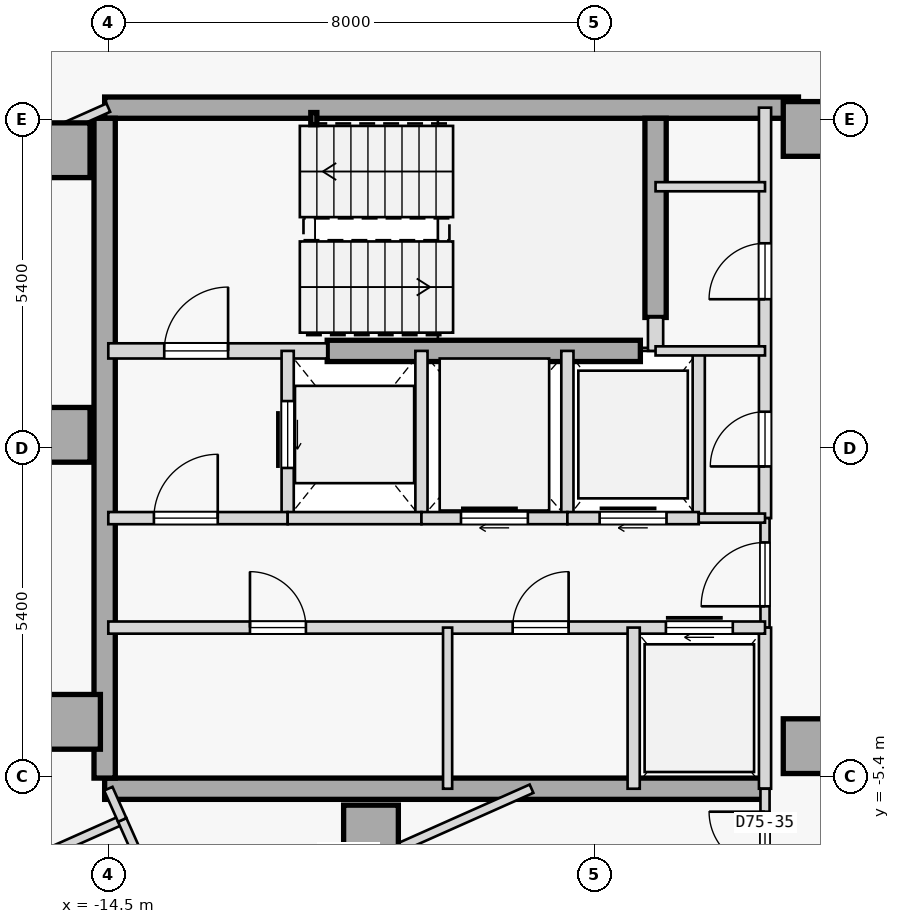
"""IFC4 building model, lengths in metres.
Left out: names, types, materials, properties, quantities, classifications, styles, units other than length and angle.
Written with IfcOpenShell. Run it as: python <this file> out.ifc"""

import sys

from ifc_helpers import new_model, si_unit, direction, frame, frame_2d, origin, origin_2d, place, context, subcontext, project, spatial, rectangle, hollow_rectangle, extrude, element, fill, save


model = new_model("IFC4")
c1 = context("Model", 3, precision=1e-05, world=origin(), true_north=direction((0.0, 1.0)))
c2 = subcontext(c1, "Body", "Model", "MODEL_VIEW")
j1 = project(units=[si_unit("LENGTHUNIT", "METRE"), si_unit("PLANEANGLEUNIT", "RADIAN")], contexts=[c1])
p1 = place(None, origin())
s1 = spatial("IfcSite", under=j1, at=p1, CompositionType="ELEMENT")
p2 = place(p1, origin())
s2 = spatial("IfcBuilding", under=s1, at=p2, CompositionType="ELEMENT")
p3 = place(p2, frame((0.0, 0.0, 281.9)))
s3 = spatial("IfcBuildingStorey", under=s2, at=p3, CompositionType="ELEMENT", Elevation=281.9)
for number, where, z_axis, x_axis in (
    (1, (-15.25, 4.9, 0.0), (0.0, 0.0, 1.0), (1.0, 0.0, 0.0)),
    (2, (-15.25, 0.22, 0.0), (0.0, 0.0, 1.0), (1.0, 0.0, 0.0)),
    (3, (-15.08, -4.5, 0.0), (0.0, 0.0, 1.0), (1.0, 0.0, 0.0)),
    (4, (-10.18, -6.32, 0.0), (0.0, 0.0, 1.0), (1.0, 0.0, 0.0)),
    (5, (-2.95, -4.9, 0.0), (0.0, 0.0, 1.0), (1.0, 0.0, 0.0)),
    (6, (-2.95, 5.25, 0.0), (0.0, 0.0, 1.0), (1.0, 0.0, 0.0)),
):
    element("IfcColumn", number, at=place(p3, frame(where, z_axis=z_axis, x_axis=x_axis)), inside=s3, PredefinedType="COLUMN", context=c2, shape_type="SweptSolid", body=[
        extrude(rectangle(XDim=0.9, YDim=0.9, at=origin_2d()), origin(), (0.0, 0.0, 1.0), 3.35),
    ])
p4 = place(p3, frame((-14.56, 5.6, 0.0), z_axis=(0.0, 0.0, 1.0), x_axis=(1.0, 0.0, 0.0)))
e7 = element("IfcWall", 7, at=p4, inside=s3, PredefinedType="SHEAR", context=c2, shape_type="SweptSolid", body=[
    extrude(rectangle(XDim=11.41, YDim=0.35, at=frame_2d((5.705, 0.0))), origin(), (0.0, 0.0, 1.0), 3.125),
])
p5 = place(p3, frame((-14.56, -5.6, 0.0), z_axis=(0.0, 0.0, 1.0), x_axis=(1.0, 0.0, 0.0)))
e8 = element("IfcWall", 8, at=p5, inside=s3, PredefinedType="SHEAR", context=c2, shape_type="SweptSolid", body=[
    extrude(rectangle(XDim=10.86, YDim=0.35, at=frame_2d((5.43, 0.0))), origin(), (0.0, 0.0, 1.0), 3.125),
])
p6 = place(p3, frame((-14.56, -5.425, 0.0), z_axis=(0.0, 0.0, 1.0), x_axis=(0.0, 1.0, 0.0)))
e9 = element("IfcWall", 9, at=p6, inside=s3, PredefinedType="SHEAR", context=c2, shape_type="SweptSolid", body=[
    extrude(rectangle(XDim=10.85, YDim=0.35, at=frame_2d((5.425, 0.0))), origin(), (0.0, 0.0, 1.0), 3.125),
])
p7 = place(p3, frame((-5.5, 2.15, 0.0), z_axis=(0.0, 0.0, 1.0), x_axis=(0.0, 1.0, 0.0)))
e10 = element("IfcWall", 10, at=p7, inside=s3, PredefinedType="SHEAR", context=c2, shape_type="SweptSolid", body=[
    extrude(rectangle(XDim=3.275, YDim=0.35, at=frame_2d((1.638, 0.0))), origin(), (0.0, 0.0, 1.0), 3.125),
])
p8 = place(p3, frame((-10.9, 1.6, 0.0), z_axis=(0.0, 0.0, 1.0), x_axis=(1.0, 0.0, 0.0)))
e11 = element("IfcWall", 11, at=p8, inside=s3, PredefinedType="SHEAR", context=c2, shape_type="SweptSolid", body=[
    extrude(rectangle(XDim=5.15, YDim=0.35, at=frame_2d((2.575, 0.0))), origin(), (0.0, 0.0, 1.0), 3.125),
])
p9 = place(p3, frame((-11.12, 5.42, 0.0), z_axis=(0.0, 0.0, 1.0), x_axis=(1.0, 0.0, 0.0)))
e12 = element("IfcColumn", 12, at=p9, inside=s3, PredefinedType="COLUMN", context=c2, shape_type="SweptSolid", body=[
    extrude(hollow_rectangle(XDim=0.1, YDim=0.2, WallThickness=0.008, at=origin_2d()), origin(), (0.0, 0.0, 1.0), 3.35),
])
p10 = place(p3, frame((-14.5, 1.6, 0.0), z_axis=(0.0, 0.0, 1.0), x_axis=(1.0, 0.0, 0.0)))
e13 = element("IfcWall", 13, at=p10, inside=s3, PredefinedType="STANDARD", context=c2, shape_type="SweptSolid", body=[
    extrude(rectangle(XDim=3.6, YDim=0.25, at=frame_2d((1.8, 0.0))), origin(), (0.0, 0.0, 1.0), 3.125),
])
p11 = place(p10, frame((0.92, 0.0, 0.0)))
e14 = element("IfcOpeningElement", 14, at=p11, cuts=e13, PredefinedType="OPENING", context=c2, shape_type="SweptSolid", body=[
    extrude(rectangle(XDim=1.05, YDim=2.15, at=frame_2d((0.525, 1.075))), frame((0.0, 0.135, 0.0), z_axis=(0.0, -1.0, 0.0), x_axis=(1.0, 0.0, 0.0)), (0.0, 0.0, 1.0), 0.27),
])
p12 = place(p3, frame((-5.5, 1.6, 0.0), z_axis=(0.0, 0.0, 1.0), x_axis=(0.0, 1.0, 0.0)))
e15 = element("IfcWall", 15, at=p12, inside=s3, PredefinedType="STANDARD", context=c2, shape_type="SweptSolid", body=[
    extrude(rectangle(XDim=0.55, YDim=0.25, at=frame_2d((0.275, 0.0))), origin(), (0.0, 0.0, 1.0), 3.125),
])
p13 = place(p3, frame((-3.7, -1.15, 0.0), z_axis=(0.0, 0.0, 1.0), x_axis=(0.0, 1.0, 0.0)))
e16 = element("IfcWall", 16, at=p13, inside=s3, PredefinedType="STANDARD", context=c2, shape_type="SweptSolid", body=[
    extrude(rectangle(XDim=6.75, YDim=0.2, at=frame_2d((3.375, 0.0))), origin(), (0.0, 0.0, 1.0), 3.125),
])
p14 = place(p13, frame((3.6, 0.0, 0.0)))
e17 = element("IfcOpeningElement", 17, at=p14, cuts=e16, PredefinedType="OPENING", context=c2, shape_type="SweptSolid", body=[
    extrude(rectangle(XDim=0.92, YDim=2.15, at=frame_2d((0.46, 1.075))), frame((0.0, 0.11, 0.0), z_axis=(0.0, -1.0, 0.0), x_axis=(1.0, 0.0, 0.0)), (0.0, 0.0, 1.0), 0.22),
])
p15 = place(p13, frame((0.85, 0.0, 0.0)))
e18 = element("IfcOpeningElement", 18, at=p15, cuts=e16, PredefinedType="OPENING", context=c2, shape_type="SweptSolid", body=[
    extrude(rectangle(XDim=0.9, YDim=2.15, at=frame_2d((0.45, 1.075))), frame((0.0, 0.11, 0.0), z_axis=(0.0, -1.0, 0.0), x_axis=(1.0, 0.0, 0.0)), (0.0, 0.0, 1.0), 0.22),
])
p16 = place(p3, frame((-3.7, -2.95, 0.0), z_axis=(0.0, 0.0, 1.0), x_axis=(0.0, 1.0, 0.0)))
e19 = element("IfcWall", 19, at=p16, inside=s3, PredefinedType="PARTITIONING", context=c2, shape_type="SweptSolid", body=[
    extrude(rectangle(XDim=1.8, YDim=0.15, at=frame_2d((0.9, 0.0))), origin(), (0.0, 0.0, 1.0), 3.125),
])
p17 = place(p16, frame((0.35, 0.0, 0.0)))
e20 = element("IfcOpeningElement", 20, at=p17, cuts=e19, PredefinedType="OPENING", context=c2, shape_type="SweptSolid", body=[
    extrude(rectangle(XDim=1.05, YDim=2.18, at=frame_2d((0.525, 1.09))), frame((0.0, 0.085, 0.0), z_axis=(0.0, -1.0, 0.0), x_axis=(1.0, 0.0, 0.0)), (0.0, 0.0, 1.0), 0.17),
])
p18 = place(p3, frame((-3.7, -5.6, 0.0), z_axis=(0.0, 0.0, 1.0), x_axis=(0.0, 1.0, 0.0)))
e21 = element("IfcWall", 21, at=p18, inside=s3, PredefinedType="STANDARD", context=c2, shape_type="SweptSolid", body=[
    extrude(rectangle(XDim=2.65, YDim=0.2, at=frame_2d((1.325, 0.0))), origin(), (0.0, 0.0, 1.0), 3.125),
])
p19 = place(p3, frame((-11.55, -1.15, 0.0), z_axis=(0.0, 0.0, 1.0), x_axis=(0.0, 1.0, 0.0)))
e22 = element("IfcWall", 22, at=p19, inside=s3, PredefinedType="STANDARD", context=c2, shape_type="SweptSolid", body=[
    extrude(rectangle(XDim=2.75, YDim=0.2, at=frame_2d((1.375, 0.0))), origin(), (0.0, 0.0, 1.0), 3.125),
])
p20 = place(p19, frame((0.825, 0.0, 0.0)))
e23 = element("IfcOpeningElement", 23, at=p20, cuts=e22, PredefinedType="OPENING", context=c2, shape_type="SweptSolid", body=[
    extrude(rectangle(XDim=1.1, YDim=2.15, at=frame_2d((0.55, 1.075))), frame((0.0, 0.11, 0.0), z_axis=(0.0, -1.0, 0.0), x_axis=(1.0, 0.0, 0.0)), (0.0, 0.0, 1.0), 0.22),
])
p21 = place(p3, frame((-9.35, -1.15, 0.0), z_axis=(0.0, 0.0, 1.0), x_axis=(0.0, 1.0, 0.0)))
e24 = element("IfcWall", 24, at=p21, inside=s3, PredefinedType="STANDARD", context=c2, shape_type="SweptSolid", body=[
    extrude(rectangle(XDim=2.75, YDim=0.2, at=frame_2d((1.375, 0.0))), origin(), (0.0, 0.0, 1.0), 3.125),
])
p22 = place(p3, frame((-14.5, -1.15, 0.0), z_axis=(0.0, 0.0, 1.0), x_axis=(1.0, 0.0, 0.0)))
e25 = element("IfcWall", 25, at=p22, inside=s3, PredefinedType="STANDARD", context=c2, shape_type="SweptSolid", body=[
    extrude(rectangle(XDim=2.95, YDim=0.2, at=frame_2d((1.475, 0.0))), origin(), (0.0, 0.0, 1.0), 3.125),
])
p23 = place(p22, frame((0.75, 0.0, 0.0)))
e26 = element("IfcOpeningElement", 26, at=p23, cuts=e25, PredefinedType="OPENING", context=c2, shape_type="SweptSolid", body=[
    extrude(rectangle(XDim=1.05, YDim=2.18, at=frame_2d((0.525, 1.09))), frame((0.0, 0.11, 0.0), z_axis=(0.0, -1.0, 0.0), x_axis=(1.0, 0.0, 0.0)), (0.0, 0.0, 1.0), 0.22),
])
p24 = place(p3, frame((-11.55, -1.15, 0.0), z_axis=(0.0, 0.0, 1.0), x_axis=(1.0, 0.0, 0.0)))
e27 = element("IfcWall", 27, at=p24, inside=s3, PredefinedType="STANDARD", context=c2, shape_type="SweptSolid", body=[
    extrude(rectangle(XDim=2.2, YDim=0.2, at=frame_2d((1.1, 0.0))), origin(), (0.0, 0.0, 1.0), 3.125),
])
p25 = place(p3, frame((-6.95, -1.15, 0.0), z_axis=(0.0, 0.0, 1.0), x_axis=(0.0, 1.0, 0.0)))
e28 = element("IfcWall", 28, at=p25, inside=s3, PredefinedType="STANDARD", context=c2, shape_type="SweptSolid", body=[
    extrude(rectangle(XDim=2.75, YDim=0.2, at=frame_2d((1.375, 0.0))), origin(), (0.0, 0.0, 1.0), 3.125),
])
p26 = place(p3, frame((-9.35, -1.15, 0.0), z_axis=(0.0, 0.0, 1.0), x_axis=(1.0, 0.0, 0.0)))
e29 = element("IfcWall", 29, at=p26, inside=s3, PredefinedType="STANDARD", context=c2, shape_type="SweptSolid", body=[
    extrude(rectangle(XDim=2.4, YDim=0.2, at=frame_2d((1.2, 0.0))), origin(), (0.0, 0.0, 1.0), 3.125),
])
p27 = place(p26, frame((0.65, 0.0, 0.0)))
e30 = element("IfcOpeningElement", 30, at=p27, cuts=e29, PredefinedType="OPENING", context=c2, shape_type="SweptSolid", body=[
    extrude(rectangle(XDim=1.1, YDim=2.15, at=frame_2d((0.55, 1.075))), frame((0.0, 0.11, 0.0), z_axis=(0.0, -1.0, 0.0), x_axis=(1.0, 0.0, 0.0)), (0.0, 0.0, 1.0), 0.22),
])
p28 = place(p3, frame((-4.79, -1.15, 0.0), z_axis=(0.0, 0.0, 1.0), x_axis=(0.0, 1.0, 0.0)))
e31 = element("IfcWall", 31, at=p28, inside=s3, PredefinedType="STANDARD", context=c2, shape_type="SweptSolid", body=[
    extrude(rectangle(XDim=2.75, YDim=0.2, at=frame_2d((1.375, 0.0))), origin(), (0.0, 0.0, 1.0), 3.125),
])
p29 = place(p3, frame((-6.95, -1.15, 0.0), z_axis=(0.0, 0.0, 1.0), x_axis=(1.0, 0.0, 0.0)))
e32 = element("IfcWall", 32, at=p29, inside=s3, PredefinedType="STANDARD", context=c2, shape_type="SweptSolid", body=[
    extrude(rectangle(XDim=2.16, YDim=0.2, at=frame_2d((1.08, 0.0))), origin(), (0.0, 0.0, 1.0), 3.125),
])
p30 = place(p29, frame((0.53, 0.0, 0.0)))
e33 = element("IfcOpeningElement", 33, at=p30, cuts=e32, PredefinedType="OPENING", context=c2, shape_type="SweptSolid", body=[
    extrude(rectangle(XDim=1.1, YDim=2.15, at=frame_2d((0.55, 1.075))), frame((0.0, 0.11, 0.0), z_axis=(0.0, -1.0, 0.0), x_axis=(1.0, 0.0, 0.0)), (0.0, 0.0, 1.0), 0.22),
])
p31 = place(p3, frame((-4.79, -1.15, 0.0), z_axis=(0.0, 0.0, 1.0), x_axis=(1.0, 0.0, 0.0)))
e34 = element("IfcWall", 34, at=p31, inside=s3, PredefinedType="PARTITIONING", context=c2, shape_type="SweptSolid", body=[
    extrude(rectangle(XDim=1.09, YDim=0.15, at=frame_2d((0.545, 0.0))), origin(), (0.0, 0.0, 1.0), 3.125),
])
p32 = place(p3, frame((-14.5, -2.95, 0.0), z_axis=(0.0, 0.0, 1.0), x_axis=(1.0, 0.0, 0.0)))
e35 = element("IfcWall", 35, at=p32, inside=s3, PredefinedType="STANDARD", context=c2, shape_type="SweptSolid", body=[
    extrude(rectangle(XDim=10.8, YDim=0.2, at=frame_2d((5.4, 0.0))), origin(), (0.0, 0.0, 1.0), 3.125),
])
p33 = place(p32, frame((9.17, 0.0, 0.0)))
e36 = element("IfcOpeningElement", 36, at=p33, cuts=e35, PredefinedType="OPENING", context=c2, shape_type="SweptSolid", body=[
    extrude(rectangle(XDim=1.1, YDim=2.15, at=frame_2d((0.55, 1.075))), frame((0.0, 0.11, 0.0), z_axis=(0.0, -1.0, 0.0), x_axis=(1.0, 0.0, 0.0)), (0.0, 0.0, 1.0), 0.22),
])
p34 = place(p32, frame((2.33, 0.0, 0.0)))
e37 = element("IfcOpeningElement", 37, at=p34, cuts=e35, PredefinedType="OPENING", context=c2, shape_type="SweptSolid", body=[
    extrude(rectangle(XDim=0.92, YDim=2.15, at=frame_2d((0.46, 1.075))), frame((0.0, 0.11, 0.0), z_axis=(0.0, -1.0, 0.0), x_axis=(1.0, 0.0, 0.0)), (0.0, 0.0, 1.0), 0.22),
])
p35 = place(p32, frame((6.65, 0.0, 0.0)))
e38 = element("IfcOpeningElement", 38, at=p35, cuts=e35, PredefinedType="OPENING", context=c2, shape_type="SweptSolid", body=[
    extrude(rectangle(XDim=0.92, YDim=2.15, at=frame_2d((0.46, 1.075))), frame((0.0, 0.11, 0.0), z_axis=(0.0, -1.0, 0.0), x_axis=(1.0, 0.0, 0.0)), (0.0, 0.0, 1.0), 0.22),
])
p36 = place(p3, frame((-5.86, -5.6, 0.0), z_axis=(0.0, 0.0, 1.0), x_axis=(0.0, 1.0, 0.0)))
e39 = element("IfcWall", 39, at=p36, inside=s3, PredefinedType="STANDARD", context=c2, shape_type="SweptSolid", body=[
    extrude(rectangle(XDim=2.65, YDim=0.2, at=frame_2d((1.325, 0.0))), origin(), (0.0, 0.0, 1.0), 3.125),
])
p37 = place(p3, frame((-8.92, -5.6, 0.0), z_axis=(0.0, 0.0, 1.0), x_axis=(0.0, 1.0, 0.0)))
e40 = element("IfcWall", 40, at=p37, inside=s3, PredefinedType="PARTITIONING", context=c2, shape_type="SweptSolid", body=[
    extrude(rectangle(XDim=2.65, YDim=0.15, at=frame_2d((1.325, 0.0))), origin(), (0.0, 0.0, 1.0), 3.125),
])
for number, where, z_axis, x_axis in (
    (41, (-5.5, 4.3, 0.0), (0.0, 0.0, 1.0), (1.0, 0.0, 0.0)),
    (42, (-5.5, 1.6, 0.0), (0.0, 0.0, 1.0), (1.0, 0.0, 0.0)),
):
    element("IfcWall", number, at=place(p3, frame(where, z_axis=z_axis, x_axis=x_axis)), inside=s3, PredefinedType="PARTITIONING", context=c2, shape_type="SweptSolid", body=[
        extrude(rectangle(XDim=1.8, YDim=0.15, at=frame_2d((0.9, 0.0))), origin(), (0.0, 0.0, 1.0), 3.125),
    ])
p38 = place(p3, frame((-3.7, -7.118, 0.0), z_axis=(0.0, 0.0, 1.0), x_axis=(0.000321543392, 0.999999948305, 0.0)))
e43 = element("IfcWall", 43, at=p38, inside=s3, PredefinedType="PARTITIONING", context=c2, shape_type="SweptSolid", body=[
    extrude(rectangle(XDim=1.519, YDim=0.15, at=frame_2d((0.759, 0.0))), origin(), (0.0, 0.0, 1.0), 3.125),
])
p39 = place(p38, frame((0.22, 0.0, 0.0)))
e44 = element("IfcOpeningElement", 44, at=p39, cuts=e43, PredefinedType="OPENING", context=c2, shape_type="SweptSolid", body=[
    extrude(rectangle(XDim=0.92, YDim=2.15, at=frame_2d((0.46, 1.075))), frame((0.0, 0.085, 0.0), z_axis=(0.0, -1.0, 0.0), x_axis=(1.0, 0.0, 0.0)), (0.0, 0.0, 1.0), 0.17),
])
p40 = place(p3, frame((-18.661, 3.747, 0.0), z_axis=(0.0, 0.0, 1.0), x_axis=(0.913535055583, 0.40676000568, 0.0)))
e45 = element("IfcWall", 45, at=p40, inside=s3, PredefinedType="PARTITIONING", context=c2, shape_type="SweptSolid", body=[
    extrude(rectangle(XDim=4.555, YDim=0.15, at=frame_2d((2.277, 0.0))), origin(), (0.0, 0.0, 1.0), 3.125),
])
p41 = place(p40, frame((1.134, 0.0, 0.0)))
e46 = element("IfcOpeningElement", 46, at=p41, cuts=e45, PredefinedType="OPENING", context=c2, shape_type="SweptSolid", body=[
    extrude(rectangle(XDim=0.92, YDim=2.15, at=frame_2d((0.46, 1.075))), frame((0.0, 0.085, 0.0), z_axis=(0.0, -1.0, 0.0), x_axis=(1.0, 0.0, 0.0)), (0.0, 0.0, 1.0), 0.17),
])
p42 = place(p3, frame((-25.014, -10.896, 0.0), z_axis=(0.0, 0.0, 1.0), x_axis=(0.913544247064, 0.406739362069, 0.0)))
e47 = element("IfcWall", 47, at=p42, inside=s3, PredefinedType="PARTITIONING", context=c2, shape_type="SweptSolid", body=[
    extrude(rectangle(XDim=11.76, YDim=0.15, at=frame_2d((5.88, 0.0))), origin(), (0.0, 0.0, 1.0), 3.125),
])
p43 = place(p42, frame((5.42, 0.0, 0.0)))
e48 = element("IfcOpeningElement", 48, at=p43, cuts=e47, PredefinedType="OPENING", context=c2, shape_type="SweptSolid", body=[
    extrude(rectangle(XDim=0.92, YDim=2.15, at=frame_2d((0.46, 1.075))), frame((0.0, 0.085, 0.0), z_axis=(0.0, -1.0, 0.0), x_axis=(1.0, 0.0, 0.0)), (0.0, 0.0, 1.0), 0.17),
])
p44 = place(p3, frame((-13.348, -8.186, 0.0), z_axis=(0.0, 0.0, 1.0), x_axis=(-0.40673740295, 0.913545119324, 0.0)))
e49 = element("IfcWall", 49, at=p44, inside=s3, PredefinedType="PARTITIONING", context=c2, shape_type="SweptSolid", body=[
    extrude(rectangle(XDim=2.269, YDim=0.15, at=frame_2d((1.134, 0.0))), origin(), (0.0, 0.0, 1.0), 3.125),
])
p45 = place(p3, frame((-14.271, -6.113, 0.0), z_axis=(0.0, 0.0, 1.0), x_axis=(-0.406622099206, 0.913596447255, 0.0)))
e50 = element("IfcWall", 50, at=p45, inside=s3, PredefinedType="PARTITIONING", context=c2, shape_type="SweptSolid", body=[
    extrude(rectangle(XDim=0.562, YDim=0.15, at=frame_2d((0.281, 0.0))), origin(), (0.0, 0.0, 1.0), 3.125),
])
p46 = place(p3, frame((-13.348, -8.186, 0.0), z_axis=(0.0, 0.0, 1.0), x_axis=(0.913551673432, 0.406722681896, 0.0)))
e51 = element("IfcWall", 51, at=p46, inside=s3, PredefinedType="PARTITIONING", context=c2, shape_type="SweptSolid", body=[
    extrude(rectangle(XDim=6.358, YDim=0.15, at=frame_2d((3.179, 0.0))), origin(), (0.0, 0.0, 1.0), 3.125),
])
p47 = place(p46, frame((0.939, 0.0, 0.0)))
e52 = element("IfcOpeningElement", 52, at=p47, cuts=e51, PredefinedType="OPENING", context=c2, shape_type="SweptSolid", body=[
    extrude(rectangle(XDim=0.92, YDim=2.15, at=frame_2d((0.46, 1.075))), frame((0.0, 0.085, 0.0), z_axis=(0.0, -1.0, 0.0), x_axis=(1.0, 0.0, 0.0)), (0.0, 0.0, 1.0), 0.17),
])
p48 = place(p11, origin())
e53 = element("IfcDoor", 53, at=p48, inside=s3, OperationType="SINGLE_SWING_RIGHT", PredefinedType="DOOR", context=c2, shape_type="SweptSolid", body=[
    extrude(rectangle(XDim=1.05, YDim=2.15, at=frame_2d((0.525, 1.075))), frame((0.0, 0.025, 0.0), z_axis=(0.0, -1.0, 0.0), x_axis=(1.0, 0.0, 0.0)), (0.0, 0.0, 1.0), 0.05),
])
fill(e14, e53)
p49 = place(p23, origin())
e54 = element("IfcDoor", 54, at=p49, inside=s3, OperationType="SINGLE_SWING_RIGHT", PredefinedType="DOOR", context=c2, shape_type="SweptSolid", body=[
    extrude(rectangle(XDim=1.05, YDim=2.18, at=frame_2d((0.525, 1.09))), frame((0.0, 0.025, 0.0), z_axis=(0.0, -1.0, 0.0), x_axis=(1.0, 0.0, 0.0)), (0.0, 0.0, 1.0), 0.05),
])
fill(e26, e54)
p50 = place(p17, origin())
e55 = element("IfcDoor", 55, at=p50, inside=s3, OperationType="SINGLE_SWING_LEFT", PredefinedType="DOOR", context=c2, shape_type="SweptSolid", body=[
    extrude(rectangle(XDim=1.05, YDim=2.18, at=frame_2d((0.525, 1.09))), frame((0.0, 0.025, 0.0), z_axis=(0.0, -1.0, 0.0), x_axis=(1.0, 0.0, 0.0)), (0.0, 0.0, 1.0), 0.05),
])
fill(e20, e55)
p51 = place(p20, origin())
e56 = element("IfcDoor", 56, at=p51, inside=s3, OperationType="SLIDING_TO_RIGHT", PredefinedType="DOOR", context=c2, shape_type="SweptSolid", body=[
    extrude(rectangle(XDim=1.1, YDim=2.15, at=frame_2d((0.55, 1.075))), frame((0.0, 0.025, 0.0), z_axis=(0.0, -1.0, 0.0), x_axis=(1.0, 0.0, 0.0)), (0.0, 0.0, 1.0), 0.05),
])
fill(e23, e56)
p52 = place(p27, origin())
e57 = element("IfcDoor", 57, at=p52, inside=s3, OperationType="SLIDING_TO_RIGHT", PredefinedType="DOOR", context=c2, shape_type="SweptSolid", body=[
    extrude(rectangle(XDim=1.1, YDim=2.15, at=frame_2d((0.55, 1.075))), frame((0.0, 0.025, 0.0), z_axis=(0.0, -1.0, 0.0), x_axis=(1.0, 0.0, 0.0)), (0.0, 0.0, 1.0), 0.05),
])
fill(e30, e57)
p53 = place(p30, origin())
e58 = element("IfcDoor", 58, at=p53, inside=s3, OperationType="SLIDING_TO_RIGHT", PredefinedType="DOOR", context=c2, shape_type="SweptSolid", body=[
    extrude(rectangle(XDim=1.1, YDim=2.15, at=frame_2d((0.55, 1.075))), frame((0.0, 0.025, 0.0), z_axis=(0.0, -1.0, 0.0), x_axis=(1.0, 0.0, 0.0)), (0.0, 0.0, 1.0), 0.05),
])
fill(e33, e58)
p54 = place(p33, origin())
e59 = element("IfcDoor", 59, at=p54, inside=s3, OperationType="SLIDING_TO_RIGHT", PredefinedType="DOOR", context=c2, shape_type="SweptSolid", body=[
    extrude(rectangle(XDim=1.1, YDim=2.15, at=frame_2d((0.55, 1.075))), frame((0.0, 0.025, 0.0), z_axis=(0.0, -1.0, 0.0), x_axis=(1.0, 0.0, 0.0)), (0.0, 0.0, 1.0), 0.05),
])
fill(e36, e59)
p55 = place(p34, origin())
e60 = element("IfcDoor", 60, at=p55, inside=s3, OperationType="SINGLE_SWING_LEFT", PredefinedType="DOOR", context=c2, shape_type="SweptSolid", body=[
    extrude(rectangle(XDim=0.92, YDim=2.15, at=frame_2d((0.46, 1.075))), frame((0.0, 0.025, 0.0), z_axis=(0.0, -1.0, 0.0), x_axis=(1.0, 0.0, 0.0)), (0.0, 0.0, 1.0), 0.05),
])
fill(e37, e60)
p56 = place(p35, origin())
e61 = element("IfcDoor", 61, at=p56, inside=s3, OperationType="SINGLE_SWING_RIGHT", PredefinedType="DOOR", context=c2, shape_type="SweptSolid", body=[
    extrude(rectangle(XDim=0.92, YDim=2.15, at=frame_2d((0.46, 1.075))), frame((0.0, 0.025, 0.0), z_axis=(0.0, -1.0, 0.0), x_axis=(1.0, 0.0, 0.0)), (0.0, 0.0, 1.0), 0.05),
])
fill(e38, e61)
p57 = place(p14, origin())
e62 = element("IfcDoor", 62, at=p57, inside=s3, OperationType="SINGLE_SWING_LEFT", PredefinedType="DOOR", context=c2, shape_type="SweptSolid", body=[
    extrude(rectangle(XDim=0.92, YDim=2.15, at=frame_2d((0.46, 1.075))), frame((0.0, 0.025, 0.0), z_axis=(0.0, -1.0, 0.0), x_axis=(1.0, 0.0, 0.0)), (0.0, 0.0, 1.0), 0.05),
])
fill(e17, e62)
p58 = place(p15, origin())
e63 = element("IfcDoor", 63, at=p58, inside=s3, OperationType="SINGLE_SWING_LEFT", PredefinedType="DOOR", context=c2, shape_type="SweptSolid", body=[
    extrude(rectangle(XDim=0.9, YDim=2.15, at=frame_2d((0.45, 1.075))), frame((0.0, 0.025, 0.0), z_axis=(0.0, -1.0, 0.0), x_axis=(1.0, 0.0, 0.0)), (0.0, 0.0, 1.0), 0.05),
])
fill(e18, e63)
p59 = place(p39, origin())
e64 = element("IfcDoor", 64, at=p59, inside=s3, OperationType="SINGLE_SWING_RIGHT", PredefinedType="DOOR", context=c2, shape_type="SweptSolid", body=[
    extrude(rectangle(XDim=0.92, YDim=2.15, at=frame_2d((0.46, 1.075))), frame((0.0, 0.025, 0.0), z_axis=(0.0, -1.0, 0.0), x_axis=(1.0, 0.0, 0.0)), (0.0, 0.0, 1.0), 0.05),
])
fill(e44, e64)
save(model, sys.argv[1])
